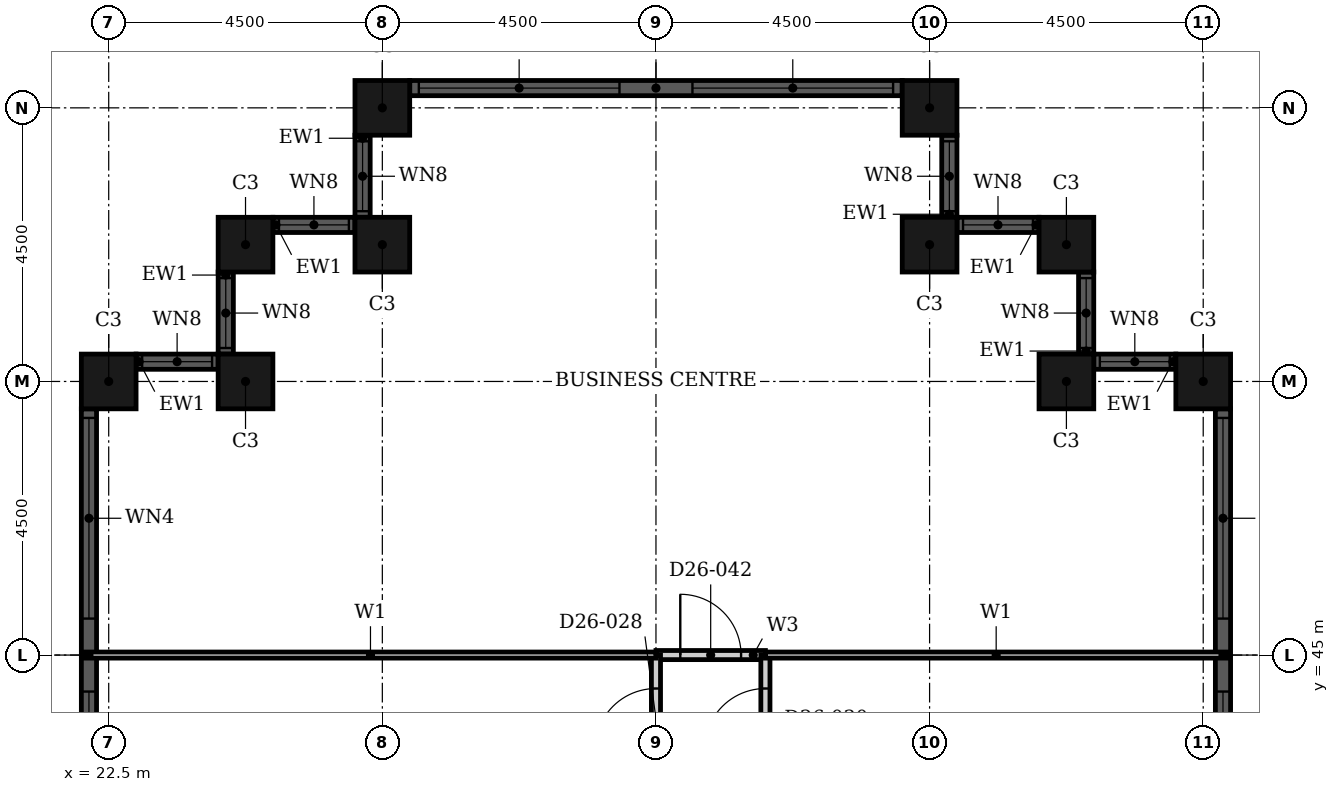
"""IFC4 building model, lengths in metres.
Left out: names, types, materials, properties, quantities, classifications, styles, units other than length and angle.
Written with IfcOpenShell. Run it as: python <this file> out.ifc"""

import sys

from ifc_helpers import new_model, si_unit, direction, frame, frame_2d, origin, origin_2d, place, context, subcontext, project, spatial, rectangle, hollow_rectangle, extrude, element, fill, save


model = new_model("IFC4")
c1 = context("Model", 3, precision=1e-05, world=origin(), true_north=direction((0.0, 1.0)))
c2 = subcontext(c1, "Body", "Model", "MODEL_VIEW")
j1 = project(units=[si_unit("LENGTHUNIT", "METRE"), si_unit("PLANEANGLEUNIT", "RADIAN")], contexts=[c1])
p1 = place(None, origin())
s1 = spatial("IfcSite", under=j1, at=p1, CompositionType="ELEMENT")
p2 = place(p1, origin())
s2 = spatial("IfcBuilding", under=s1, at=p2, CompositionType="ELEMENT")
p3 = place(p2, frame((0.0, 0.0, 108.0)))
s3 = spatial("IfcBuildingStorey", under=s2, at=p3, CompositionType="ELEMENT", Elevation=108.0)
for number, where, z_axis, x_axis in (
    (1, (40.5, 49.5, 0.0), (0.0, 0.0, 1.0), (1.0, 0.0, 0.0)),
    (2, (38.25, 49.5, 0.0), (0.0, 0.0, 1.0), (1.0, 0.0, 0.0)),
    (3, (38.25, 51.75, 0.0), (0.0, 0.0, 1.0), (1.0, 0.0, 0.0)),
    (4, (36.0, 51.75, 0.0), (0.0, 0.0, 1.0), (1.0, 0.0, 0.0)),
    (5, (36.0, 54.0, 0.0), (0.0, 0.0, 1.0), (1.0, 0.0, 0.0)),
    (6, (27.0, 54.0, 0.0), (0.0, 0.0, 1.0), (1.0, 0.0, 0.0)),
    (7, (27.0, 51.75, 0.0), (0.0, 0.0, 1.0), (1.0, 0.0, 0.0)),
    (8, (24.75, 51.75, 0.0), (0.0, 0.0, 1.0), (1.0, 0.0, 0.0)),
    (9, (24.75, 49.5, 0.0), (0.0, 0.0, 1.0), (1.0, 0.0, 0.0)),
    (10, (22.5, 49.5, 0.0), (0.0, 0.0, 1.0), (1.0, 0.0, 0.0)),
):
    element("IfcColumn", number, at=place(p3, frame(where, z_axis=z_axis, x_axis=x_axis)), inside=s3, PredefinedType="COLUMN", context=c2, shape_type="SweptSolid", body=[
        extrude(hollow_rectangle(XDim=0.9, YDim=0.9, WallThickness=0.028, at=origin_2d()), origin(), (0.0, 0.0, 1.0), 3.6),
    ])
p4 = place(p3, frame((40.825, 40.95, 0.0), z_axis=(0.0, 0.0, 1.0), x_axis=(0.0, 1.0, 0.0)))
e11 = element("IfcWall", 11, at=p4, inside=s3, PredefinedType="SOLIDWALL", context=c2, shape_type="SweptSolid", body=[
    extrude(rectangle(XDim=8.1, YDim=0.25, at=frame_2d((4.05, 0.0))), origin(), (0.0, 0.0, 1.0), 3.6),
])
p5 = place(p4, frame((0.15, 0.0, 0.9)))
e12 = element("IfcOpeningElement", 12, at=p5, cuts=e11, PredefinedType="OPENING", context=c2, shape_type="SweptSolid", body=[
    extrude(rectangle(XDim=3.3, YDim=2.08, at=frame_2d((1.65, 1.04))), frame((0.0, 0.135, 0.0), z_axis=(0.0, -1.0, 0.0), x_axis=(1.0, 0.0, 0.0)), (0.0, 0.0, 1.0), 0.27),
])
p6 = place(p4, frame((4.65, 0.0, 0.9)))
e13 = element("IfcOpeningElement", 13, at=p6, cuts=e11, PredefinedType="OPENING", context=c2, shape_type="SweptSolid", body=[
    extrude(rectangle(XDim=3.3, YDim=2.08, at=frame_2d((1.65, 1.04))), frame((0.0, 0.135, 0.0), z_axis=(0.0, -1.0, 0.0), x_axis=(1.0, 0.0, 0.0)), (0.0, 0.0, 1.0), 0.27),
])
p7 = place(p3, frame((40.05, 49.825, 0.0), z_axis=(0.0, 0.0, 1.0), x_axis=(-1.0, 0.0, 0.0)))
e14 = element("IfcWall", 14, at=p7, inside=s3, PredefinedType="SOLIDWALL", context=c2, shape_type="SweptSolid", body=[
    extrude(rectangle(XDim=1.35, YDim=0.25, at=frame_2d((0.675, 0.0))), origin(), (0.0, 0.0, 1.0), 3.6),
])
p8 = place(p7, frame((0.1, 0.0, 0.9)))
e15 = element("IfcOpeningElement", 15, at=p8, cuts=e14, PredefinedType="OPENING", context=c2, shape_type="SweptSolid", body=[
    extrude(rectangle(XDim=1.15, YDim=2.08, at=frame_2d((0.575, 1.04))), frame((0.0, 0.135, 0.0), z_axis=(0.0, -1.0, 0.0), x_axis=(1.0, 0.0, 0.0)), (0.0, 0.0, 1.0), 0.27),
])
p9 = place(p3, frame((38.575, 49.95, 0.0), z_axis=(0.0, 0.0, 1.0), x_axis=(0.0, 1.0, 0.0)))
e16 = element("IfcWall", 16, at=p9, inside=s3, PredefinedType="SOLIDWALL", context=c2, shape_type="SweptSolid", body=[
    extrude(rectangle(XDim=1.35, YDim=0.25, at=frame_2d((0.675, 0.0))), origin(), (0.0, 0.0, 1.0), 3.6),
])
p10 = place(p9, frame((0.1, 0.0, 0.9)))
e17 = element("IfcOpeningElement", 17, at=p10, cuts=e16, PredefinedType="OPENING", context=c2, shape_type="SweptSolid", body=[
    extrude(rectangle(XDim=1.15, YDim=2.08, at=frame_2d((0.575, 1.04))), frame((0.0, 0.135, 0.0), z_axis=(0.0, -1.0, 0.0), x_axis=(1.0, 0.0, 0.0)), (0.0, 0.0, 1.0), 0.27),
])
p11 = place(p3, frame((37.8, 52.075, 0.0), z_axis=(0.0, 0.0, 1.0), x_axis=(-1.0, 0.0, 0.0)))
e18 = element("IfcWall", 18, at=p11, inside=s3, PredefinedType="SOLIDWALL", context=c2, shape_type="SweptSolid", body=[
    extrude(rectangle(XDim=1.35, YDim=0.25, at=frame_2d((0.675, 0.0))), origin(), (0.0, 0.0, 1.0), 3.6),
])
p12 = place(p11, frame((0.1, 0.0, 0.9)))
e19 = element("IfcOpeningElement", 19, at=p12, cuts=e18, PredefinedType="OPENING", context=c2, shape_type="SweptSolid", body=[
    extrude(rectangle(XDim=1.15, YDim=2.08, at=frame_2d((0.575, 1.04))), frame((0.0, 0.135, 0.0), z_axis=(0.0, -1.0, 0.0), x_axis=(1.0, 0.0, 0.0)), (0.0, 0.0, 1.0), 0.27),
])
p13 = place(p3, frame((36.325, 52.2, 0.0), z_axis=(0.0, 0.0, 1.0), x_axis=(0.0, 1.0, 0.0)))
e20 = element("IfcWall", 20, at=p13, inside=s3, PredefinedType="SOLIDWALL", context=c2, shape_type="SweptSolid", body=[
    extrude(rectangle(XDim=1.35, YDim=0.25, at=frame_2d((0.675, 0.0))), origin(), (0.0, 0.0, 1.0), 3.6),
])
p14 = place(p13, frame((0.1, 0.0, 0.9)))
e21 = element("IfcOpeningElement", 21, at=p14, cuts=e20, PredefinedType="OPENING", context=c2, shape_type="SweptSolid", body=[
    extrude(rectangle(XDim=1.15, YDim=2.08, at=frame_2d((0.575, 1.04))), frame((0.0, 0.135, 0.0), z_axis=(0.0, -1.0, 0.0), x_axis=(1.0, 0.0, 0.0)), (0.0, 0.0, 1.0), 0.27),
])
p15 = place(p3, frame((35.55, 54.325, 0.0), z_axis=(0.0, 0.0, 1.0), x_axis=(-1.0, 0.0, 0.0)))
e22 = element("IfcWall", 22, at=p15, inside=s3, PredefinedType="SOLIDWALL", context=c2, shape_type="SweptSolid", body=[
    extrude(rectangle(XDim=8.1, YDim=0.25, at=frame_2d((4.05, 0.0))), origin(), (0.0, 0.0, 1.0), 3.6),
])
p16 = place(p15, frame((0.15, 0.0, 0.9)))
e23 = element("IfcOpeningElement", 23, at=p16, cuts=e22, PredefinedType="OPENING", context=c2, shape_type="SweptSolid", body=[
    extrude(rectangle(XDim=3.3, YDim=2.08, at=frame_2d((1.65, 1.04))), frame((0.0, 0.135, 0.0), z_axis=(0.0, -1.0, 0.0), x_axis=(1.0, 0.0, 0.0)), (0.0, 0.0, 1.0), 0.27),
])
p17 = place(p15, frame((4.65, 0.0, 0.9)))
e24 = element("IfcOpeningElement", 24, at=p17, cuts=e22, PredefinedType="OPENING", context=c2, shape_type="SweptSolid", body=[
    extrude(rectangle(XDim=3.3, YDim=2.08, at=frame_2d((1.65, 1.04))), frame((0.0, 0.135, 0.0), z_axis=(0.0, -1.0, 0.0), x_axis=(1.0, 0.0, 0.0)), (0.0, 0.0, 1.0), 0.27),
])
p18 = place(p3, frame((26.675, 53.55, 0.0), z_axis=(0.0, 0.0, 1.0), x_axis=(0.0, -1.0, 0.0)))
e25 = element("IfcWall", 25, at=p18, inside=s3, PredefinedType="SOLIDWALL", context=c2, shape_type="SweptSolid", body=[
    extrude(rectangle(XDim=1.35, YDim=0.25, at=frame_2d((0.675, 0.0))), origin(), (0.0, 0.0, 1.0), 3.6),
])
p19 = place(p18, frame((0.1, 0.0, 0.9)))
e26 = element("IfcOpeningElement", 26, at=p19, cuts=e25, PredefinedType="OPENING", context=c2, shape_type="SweptSolid", body=[
    extrude(rectangle(XDim=1.15, YDim=2.08, at=frame_2d((0.575, 1.04))), frame((0.0, 0.135, 0.0), z_axis=(0.0, -1.0, 0.0), x_axis=(1.0, 0.0, 0.0)), (0.0, 0.0, 1.0), 0.27),
])
p20 = place(p3, frame((26.55, 52.075, 0.0), z_axis=(0.0, 0.0, 1.0), x_axis=(-1.0, 0.0, 0.0)))
e27 = element("IfcWall", 27, at=p20, inside=s3, PredefinedType="SOLIDWALL", context=c2, shape_type="SweptSolid", body=[
    extrude(rectangle(XDim=1.35, YDim=0.25, at=frame_2d((0.675, 0.0))), origin(), (0.0, 0.0, 1.0), 3.6),
])
p21 = place(p20, frame((0.1, 0.0, 0.9)))
e28 = element("IfcOpeningElement", 28, at=p21, cuts=e27, PredefinedType="OPENING", context=c2, shape_type="SweptSolid", body=[
    extrude(rectangle(XDim=1.15, YDim=2.08, at=frame_2d((0.575, 1.04))), frame((0.0, 0.135, 0.0), z_axis=(0.0, -1.0, 0.0), x_axis=(1.0, 0.0, 0.0)), (0.0, 0.0, 1.0), 0.27),
])
p22 = place(p3, frame((24.425, 51.3, 0.0), z_axis=(0.0, 0.0, 1.0), x_axis=(0.0, -1.0, 0.0)))
e29 = element("IfcWall", 29, at=p22, inside=s3, PredefinedType="SOLIDWALL", context=c2, shape_type="SweptSolid", body=[
    extrude(rectangle(XDim=1.35, YDim=0.25, at=frame_2d((0.675, 0.0))), origin(), (0.0, 0.0, 1.0), 3.6),
])
p23 = place(p22, frame((0.1, 0.0, 0.9)))
e30 = element("IfcOpeningElement", 30, at=p23, cuts=e29, PredefinedType="OPENING", context=c2, shape_type="SweptSolid", body=[
    extrude(rectangle(XDim=1.15, YDim=2.08, at=frame_2d((0.575, 1.04))), frame((0.0, 0.135, 0.0), z_axis=(0.0, -1.0, 0.0), x_axis=(1.0, 0.0, 0.0)), (0.0, 0.0, 1.0), 0.27),
])
p24 = place(p3, frame((24.3, 49.825, 0.0), z_axis=(0.0, 0.0, 1.0), x_axis=(-1.0, 0.0, 0.0)))
e31 = element("IfcWall", 31, at=p24, inside=s3, PredefinedType="SOLIDWALL", context=c2, shape_type="SweptSolid", body=[
    extrude(rectangle(XDim=1.35, YDim=0.25, at=frame_2d((0.675, 0.0))), origin(), (0.0, 0.0, 1.0), 3.6),
])
p25 = place(p24, frame((0.1, 0.0, 0.9)))
e32 = element("IfcOpeningElement", 32, at=p25, cuts=e31, PredefinedType="OPENING", context=c2, shape_type="SweptSolid", body=[
    extrude(rectangle(XDim=1.15, YDim=2.08, at=frame_2d((0.575, 1.04))), frame((0.0, 0.135, 0.0), z_axis=(0.0, -1.0, 0.0), x_axis=(1.0, 0.0, 0.0)), (0.0, 0.0, 1.0), 0.27),
])
p26 = place(p3, frame((22.175, 49.05, 0.0), z_axis=(0.0, 0.0, 1.0), x_axis=(0.0, -1.0, 0.0)))
e33 = element("IfcWall", 33, at=p26, inside=s3, PredefinedType="SOLIDWALL", context=c2, shape_type="SweptSolid", body=[
    extrude(rectangle(XDim=8.1, YDim=0.25, at=frame_2d((4.05, 0.0))), origin(), (0.0, 0.0, 1.0), 3.6),
])
p27 = place(p26, frame((0.15, 0.0, 0.9)))
e34 = element("IfcOpeningElement", 34, at=p27, cuts=e33, PredefinedType="OPENING", context=c2, shape_type="SweptSolid", body=[
    extrude(rectangle(XDim=3.3, YDim=2.08, at=frame_2d((1.65, 1.04))), frame((0.0, 0.135, 0.0), z_axis=(0.0, -1.0, 0.0), x_axis=(1.0, 0.0, 0.0)), (0.0, 0.0, 1.0), 0.27),
])
p28 = place(p26, frame((4.65, 0.0, 0.9)))
e35 = element("IfcOpeningElement", 35, at=p28, cuts=e33, PredefinedType="OPENING", context=c2, shape_type="SweptSolid", body=[
    extrude(rectangle(XDim=3.3, YDim=2.08, at=frame_2d((1.65, 1.04))), frame((0.0, 0.135, 0.0), z_axis=(0.0, -1.0, 0.0), x_axis=(1.0, 0.0, 0.0)), (0.0, 0.0, 1.0), 0.27),
])
p29 = place(p3, frame((31.5, 45.0, 0.0), z_axis=(0.0, 0.0, 1.0), x_axis=(1.0, 0.0, 0.0)))
e36 = element("IfcWall", 36, at=p29, inside=s3, PredefinedType="PARTITIONING", context=c2, shape_type="SweptSolid", body=[
    extrude(rectangle(XDim=1.8, YDim=0.15, at=frame_2d((0.9, 0.0))), origin(), (0.0, 0.0, 1.0), 3.3),
])
p30 = place(p29, frame((0.4, 0.0, 0.0)))
e37 = element("IfcOpeningElement", 37, at=p30, cuts=e36, PredefinedType="OPENING", context=c2, shape_type="SweptSolid", body=[
    extrude(rectangle(XDim=1.0, YDim=2.1, at=frame_2d((0.5, 1.05))), frame((0.0, 0.085, 0.0), z_axis=(0.0, -1.0, 0.0), x_axis=(1.0, 0.0, 0.0)), (0.0, 0.0, 1.0), 0.17),
])
p31 = place(p3, frame((31.5, 33.3, 0.0), z_axis=(0.0, 0.0, 1.0), x_axis=(0.0, 1.0, 0.0)))
e38 = element("IfcWall", 38, at=p31, inside=s3, PredefinedType="PARTITIONING", context=c2, shape_type="SweptSolid", body=[
    extrude(rectangle(XDim=11.7, YDim=0.15, at=frame_2d((5.85, 0.0))), origin(), (0.0, 0.0, 1.0), 2.58),
])
p32 = place(p31, frame((10.15, 0.0, 0.0)))
e39 = element("IfcOpeningElement", 39, at=p32, cuts=e38, PredefinedType="OPENING", context=c2, shape_type="SweptSolid", body=[
    extrude(rectangle(XDim=1.0, YDim=2.1, at=frame_2d((0.5, 1.05))), frame((0.0, 0.085, 0.0), z_axis=(0.0, -1.0, 0.0), x_axis=(1.0, 0.0, 0.0)), (0.0, 0.0, 1.0), 0.17),
])
p33 = place(p3, frame((33.3, 33.3, 0.0), z_axis=(0.0, 0.0, 1.0), x_axis=(0.0, 1.0, 0.0)))
e40 = element("IfcWall", 40, at=p33, inside=s3, PredefinedType="PARTITIONING", context=c2, shape_type="SweptSolid", body=[
    extrude(rectangle(XDim=11.7, YDim=0.15, at=frame_2d((5.85, 0.0))), origin(), (0.0, 0.0, 1.0), 3.3),
])
p34 = place(p33, frame((10.15, 0.0, 0.0)))
e41 = element("IfcOpeningElement", 41, at=p34, cuts=e40, PredefinedType="OPENING", context=c2, shape_type="SweptSolid", body=[
    extrude(rectangle(XDim=1.0, YDim=2.1, at=frame_2d((0.5, 1.05))), frame((0.0, 0.085, 0.0), z_axis=(0.0, -1.0, 0.0), x_axis=(1.0, 0.0, 0.0)), (0.0, 0.0, 1.0), 0.17),
])
p35 = place(p3, frame((33.3, 45.0, 0.0), z_axis=(0.0, 0.0, 1.0), x_axis=(1.0, 0.0, 0.0)))
e42 = element("IfcWall", 42, at=p35, inside=s3, PredefinedType="PARTITIONING", context=c2, shape_type="SweptSolid", body=[
    extrude(rectangle(XDim=7.59, YDim=0.1, at=frame_2d((3.795, 0.0))), origin(), (0.0, 0.0, 1.0), 3.3),
])
p36 = place(p3, frame((22.11, 45.0, 0.0), z_axis=(0.0, 0.0, 1.0), x_axis=(1.0, 0.0, 0.0)))
e43 = element("IfcWall", 43, at=p36, inside=s3, PredefinedType="PARTITIONING", context=c2, shape_type="SweptSolid", body=[
    extrude(rectangle(XDim=9.39, YDim=0.1, at=frame_2d((4.695, 0.0))), origin(), (0.0, 0.0, 1.0), 3.3),
])
p37 = place(p5, origin())
e44 = element("IfcWindow", 44, at=p37, inside=s3, PartitioningType="SINGLE_PANEL", PredefinedType="WINDOW", context=c2, shape_type="SweptSolid", body=[
    extrude(rectangle(XDim=3.3, YDim=2.08, at=frame_2d((1.65, 1.04))), frame((0.0, 0.03, 0.0), z_axis=(0.0, -1.0, 0.0), x_axis=(1.0, 0.0, 0.0)), (0.0, 0.0, 1.0), 0.06),
])
fill(e12, e44)
p38 = place(p6, origin())
e45 = element("IfcWindow", 45, at=p38, inside=s3, PartitioningType="SINGLE_PANEL", PredefinedType="WINDOW", context=c2, shape_type="SweptSolid", body=[
    extrude(rectangle(XDim=3.3, YDim=2.08, at=frame_2d((1.65, 1.04))), frame((0.0, 0.03, 0.0), z_axis=(0.0, -1.0, 0.0), x_axis=(1.0, 0.0, 0.0)), (0.0, 0.0, 1.0), 0.06),
])
fill(e13, e45)
p39 = place(p8, origin())
e46 = element("IfcWindow", 46, at=p39, inside=s3, PartitioningType="SINGLE_PANEL", PredefinedType="WINDOW", context=c2, shape_type="SweptSolid", body=[
    extrude(rectangle(XDim=1.15, YDim=2.08, at=frame_2d((0.575, 1.04))), frame((0.0, 0.03, 0.0), z_axis=(0.0, -1.0, 0.0), x_axis=(1.0, 0.0, 0.0)), (0.0, 0.0, 1.0), 0.06),
])
fill(e15, e46)
p40 = place(p10, origin())
e47 = element("IfcWindow", 47, at=p40, inside=s3, PartitioningType="SINGLE_PANEL", PredefinedType="WINDOW", context=c2, shape_type="SweptSolid", body=[
    extrude(rectangle(XDim=1.15, YDim=2.08, at=frame_2d((0.575, 1.04))), frame((0.0, 0.03, 0.0), z_axis=(0.0, -1.0, 0.0), x_axis=(1.0, 0.0, 0.0)), (0.0, 0.0, 1.0), 0.06),
])
fill(e17, e47)
p41 = place(p12, origin())
e48 = element("IfcWindow", 48, at=p41, inside=s3, PartitioningType="SINGLE_PANEL", PredefinedType="WINDOW", context=c2, shape_type="SweptSolid", body=[
    extrude(rectangle(XDim=1.15, YDim=2.08, at=frame_2d((0.575, 1.04))), frame((0.0, 0.03, 0.0), z_axis=(0.0, -1.0, 0.0), x_axis=(1.0, 0.0, 0.0)), (0.0, 0.0, 1.0), 0.06),
])
fill(e19, e48)
p42 = place(p14, origin())
e49 = element("IfcWindow", 49, at=p42, inside=s3, PartitioningType="SINGLE_PANEL", PredefinedType="WINDOW", context=c2, shape_type="SweptSolid", body=[
    extrude(rectangle(XDim=1.15, YDim=2.08, at=frame_2d((0.575, 1.04))), frame((0.0, 0.03, 0.0), z_axis=(0.0, -1.0, 0.0), x_axis=(1.0, 0.0, 0.0)), (0.0, 0.0, 1.0), 0.06),
])
fill(e21, e49)
p43 = place(p16, origin())
e50 = element("IfcWindow", 50, at=p43, inside=s3, PartitioningType="SINGLE_PANEL", PredefinedType="WINDOW", context=c2, shape_type="SweptSolid", body=[
    extrude(rectangle(XDim=3.3, YDim=2.08, at=frame_2d((1.65, 1.04))), frame((0.0, 0.03, 0.0), z_axis=(0.0, -1.0, 0.0), x_axis=(1.0, 0.0, 0.0)), (0.0, 0.0, 1.0), 0.06),
])
fill(e23, e50)
p44 = place(p17, origin())
e51 = element("IfcWindow", 51, at=p44, inside=s3, PartitioningType="SINGLE_PANEL", PredefinedType="WINDOW", context=c2, shape_type="SweptSolid", body=[
    extrude(rectangle(XDim=3.3, YDim=2.08, at=frame_2d((1.65, 1.04))), frame((0.0, 0.03, 0.0), z_axis=(0.0, -1.0, 0.0), x_axis=(1.0, 0.0, 0.0)), (0.0, 0.0, 1.0), 0.06),
])
fill(e24, e51)
p45 = place(p19, origin())
e52 = element("IfcWindow", 52, at=p45, inside=s3, PartitioningType="SINGLE_PANEL", PredefinedType="WINDOW", context=c2, shape_type="SweptSolid", body=[
    extrude(rectangle(XDim=1.15, YDim=2.08, at=frame_2d((0.575, 1.04))), frame((0.0, 0.03, 0.0), z_axis=(0.0, -1.0, 0.0), x_axis=(1.0, 0.0, 0.0)), (0.0, 0.0, 1.0), 0.06),
])
fill(e26, e52)
p46 = place(p21, origin())
e53 = element("IfcWindow", 53, at=p46, inside=s3, PartitioningType="SINGLE_PANEL", PredefinedType="WINDOW", context=c2, shape_type="SweptSolid", body=[
    extrude(rectangle(XDim=1.15, YDim=2.08, at=frame_2d((0.575, 1.04))), frame((0.0, 0.03, 0.0), z_axis=(0.0, -1.0, 0.0), x_axis=(1.0, 0.0, 0.0)), (0.0, 0.0, 1.0), 0.06),
])
fill(e28, e53)
p47 = place(p23, origin())
e54 = element("IfcWindow", 54, at=p47, inside=s3, PartitioningType="SINGLE_PANEL", PredefinedType="WINDOW", context=c2, shape_type="SweptSolid", body=[
    extrude(rectangle(XDim=1.15, YDim=2.08, at=frame_2d((0.575, 1.04))), frame((0.0, 0.03, 0.0), z_axis=(0.0, -1.0, 0.0), x_axis=(1.0, 0.0, 0.0)), (0.0, 0.0, 1.0), 0.06),
])
fill(e30, e54)
p48 = place(p25, origin())
e55 = element("IfcWindow", 55, at=p48, inside=s3, PartitioningType="SINGLE_PANEL", PredefinedType="WINDOW", context=c2, shape_type="SweptSolid", body=[
    extrude(rectangle(XDim=1.15, YDim=2.08, at=frame_2d((0.575, 1.04))), frame((0.0, 0.03, 0.0), z_axis=(0.0, -1.0, 0.0), x_axis=(1.0, 0.0, 0.0)), (0.0, 0.0, 1.0), 0.06),
])
fill(e32, e55)
p49 = place(p27, origin())
e56 = element("IfcWindow", 56, at=p49, inside=s3, PartitioningType="SINGLE_PANEL", PredefinedType="WINDOW", context=c2, shape_type="SweptSolid", body=[
    extrude(rectangle(XDim=3.3, YDim=2.08, at=frame_2d((1.65, 1.04))), frame((0.0, 0.03, 0.0), z_axis=(0.0, -1.0, 0.0), x_axis=(1.0, 0.0, 0.0)), (0.0, 0.0, 1.0), 0.06),
])
fill(e34, e56)
p50 = place(p28, origin())
e57 = element("IfcWindow", 57, at=p50, inside=s3, PartitioningType="SINGLE_PANEL", PredefinedType="WINDOW", context=c2, shape_type="SweptSolid", body=[
    extrude(rectangle(XDim=3.3, YDim=2.08, at=frame_2d((1.65, 1.04))), frame((0.0, 0.03, 0.0), z_axis=(0.0, -1.0, 0.0), x_axis=(1.0, 0.0, 0.0)), (0.0, 0.0, 1.0), 0.06),
])
fill(e35, e57)
p51 = place(p32, origin())
e58 = element("IfcDoor", 58, at=p51, inside=s3, OperationType="SINGLE_SWING_RIGHT", PredefinedType="DOOR", context=c2, shape_type="SweptSolid", body=[
    extrude(rectangle(XDim=1.0, YDim=2.1, at=frame_2d((0.5, 1.05))), frame((0.0, 0.025, 0.0), z_axis=(0.0, -1.0, 0.0), x_axis=(1.0, 0.0, 0.0)), (0.0, 0.0, 1.0), 0.05),
])
fill(e39, e58)
p52 = place(p34, origin())
e59 = element("IfcDoor", 59, at=p52, inside=s3, OperationType="SINGLE_SWING_RIGHT", PredefinedType="DOOR", context=c2, shape_type="SweptSolid", body=[
    extrude(rectangle(XDim=1.0, YDim=2.1, at=frame_2d((0.5, 1.05))), frame((0.0, 0.025, 0.0), z_axis=(0.0, -1.0, 0.0), x_axis=(1.0, 0.0, 0.0)), (0.0, 0.0, 1.0), 0.05),
])
fill(e41, e59)
p53 = place(p30, origin())
e60 = element("IfcDoor", 60, at=p53, inside=s3, OperationType="SINGLE_SWING_LEFT", PredefinedType="DOOR", context=c2, shape_type="SweptSolid", body=[
    extrude(rectangle(XDim=1.0, YDim=2.1, at=frame_2d((0.5, 1.05))), frame((0.0, 0.025, 0.0), z_axis=(0.0, -1.0, 0.0), x_axis=(1.0, 0.0, 0.0)), (0.0, 0.0, 1.0), 0.05),
])
fill(e37, e60)
save(model, sys.argv[1])
